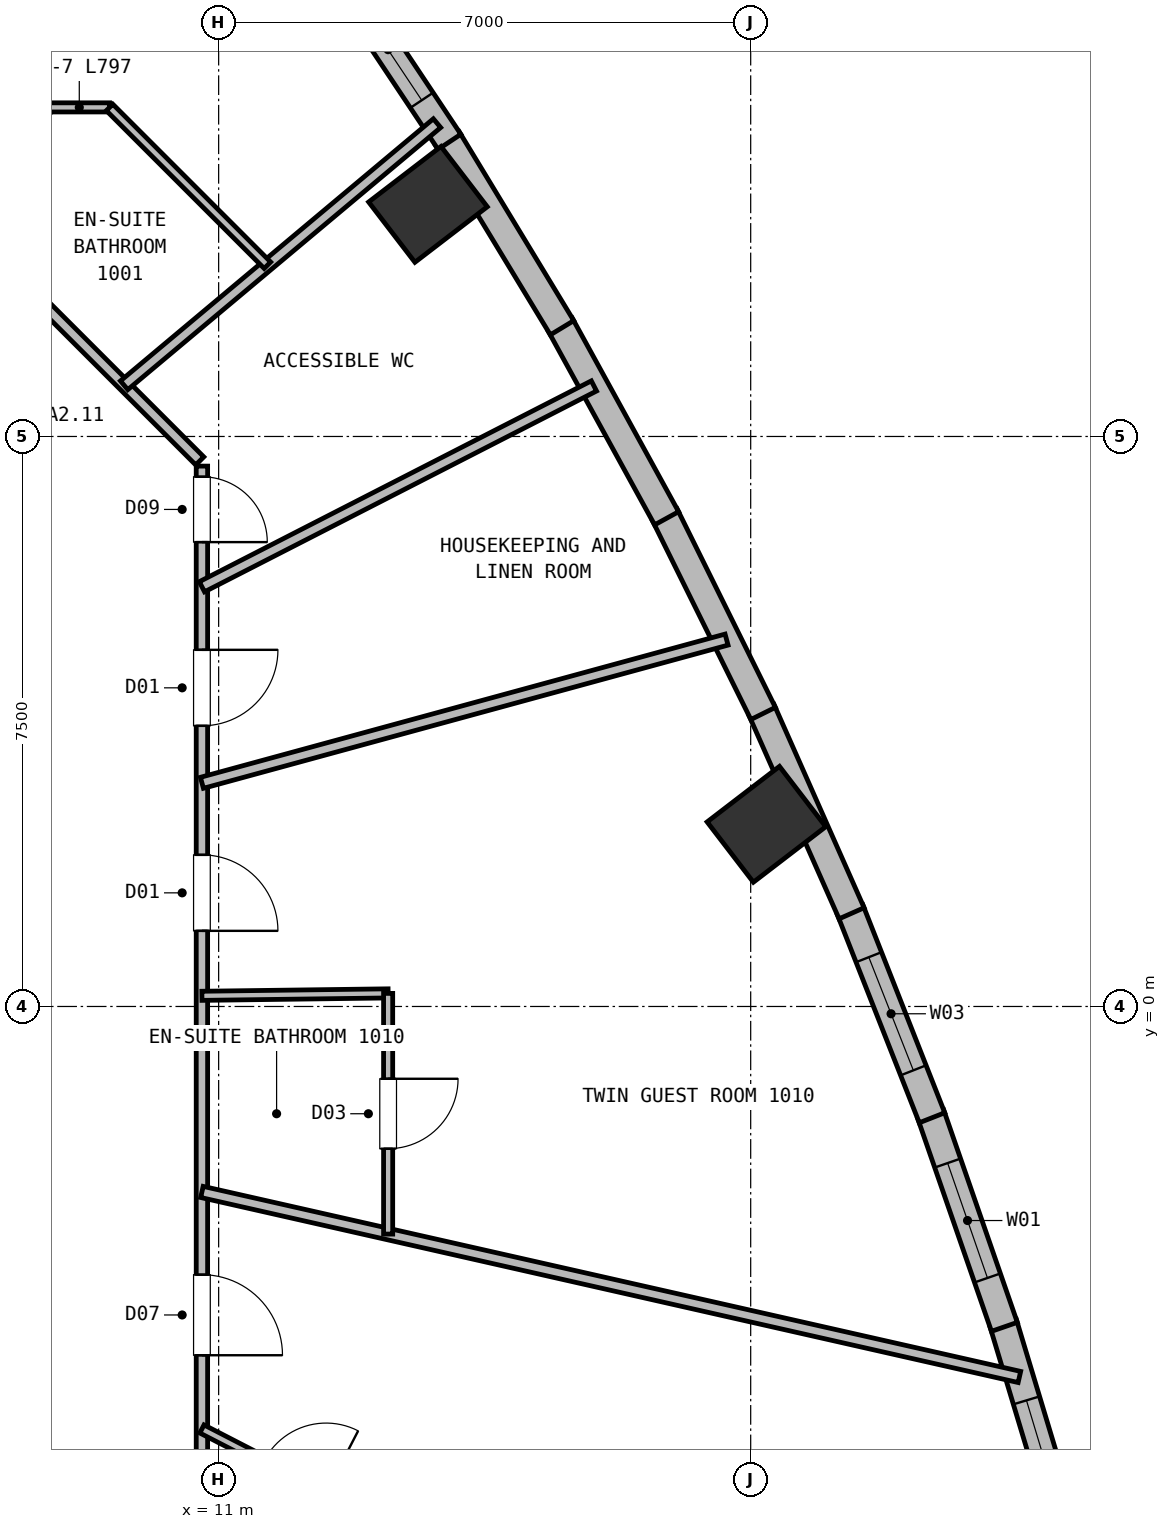
"""IFC4 building model, lengths in metres.
Left out: names, types, materials, properties, quantities, classifications, styles, units other than length and angle.
Written with IfcOpenShell. Run it as: python <this file> out.ifc"""

import sys

from ifc_helpers import new_model, si_unit, direction, frame, frame_2d, origin, origin_2d, place, context, subcontext, project, spatial, rectangle, extrude, element, fill, save


model = new_model("IFC4")
c1 = context("Model", 3, precision=1e-05, world=origin(), true_north=direction((0.0, 1.0)))
c2 = subcontext(c1, "Body", "Model", "MODEL_VIEW")
j1 = project(units=[si_unit("LENGTHUNIT", "METRE"), si_unit("PLANEANGLEUNIT", "RADIAN")], contexts=[c1])
p1 = place(None, origin())
s1 = spatial("IfcSite", under=j1, at=p1, CompositionType="ELEMENT")
p2 = place(p1, origin())
s2 = spatial("IfcBuilding", under=s1, at=p2, CompositionType="ELEMENT")
p3 = place(p2, frame((0.0, 0.0, 34.25)))
s3 = spatial("IfcBuildingStorey", under=s2, at=p3, CompositionType="ELEMENT", Elevation=34.25)
for number, where, z_axis, x_axis in (
    (1, (18.207, 2.397, 0.0), (0.0, 0.0, 1.0), (-0.609, 0.793, 0.0)),
    (2, (13.754, 10.554, 0.0), (0.0, 0.0, 1.0), (-0.609, 0.793, 0.0)),
):
    element("IfcColumn", number, at=place(p3, frame(where, z_axis=z_axis, x_axis=x_axis)), inside=s3, PredefinedType="COLUMN", context=c2, shape_type="SweptSolid", body=[
        extrude(rectangle(XDim=1.0, YDim=1.2, at=origin_2d()), origin(), (0.0, 0.0, 1.0), 3.75),
    ])
p4 = place(p3, frame((21.323, -4.168, 0.0), z_axis=(0.0, 0.0, 1.0), x_axis=(0.288532480862, -0.957470107882, 0.0)))
e3 = element("IfcWall", 3, at=p4, inside=s3, PredefinedType="SOLIDWALL", context=c2, shape_type="SweptSolid", body=[
    extrude(rectangle(XDim=2.987, YDim=0.36, at=frame_2d((1.493, 0.0))), origin(), (0.0, 0.0, 1.0), 3.5),
])
p5 = place(p4, frame((1.06, 0.0, 0.72)))
e4 = element("IfcOpeningElement", 4, at=p5, cuts=e3, PredefinedType="OPENING", context=c2, shape_type="SweptSolid", body=[
    extrude(rectangle(XDim=1.6, YDim=1.88, at=frame_2d((0.8, 0.94))), frame((0.0, 0.19, 0.0), z_axis=(0.0, -1.0, 0.0), x_axis=(1.0, 0.0, 0.0)), (0.0, 0.0, 1.0), 0.38),
])
p6 = place(p3, frame((20.368, -1.417, 0.0), z_axis=(0.0, 0.0, 1.0), x_axis=(0.327385218266, -0.944890956069, 0.0)))
e5 = element("IfcWall", 5, at=p6, inside=s3, PredefinedType="SOLIDWALL", context=c2, shape_type="SweptSolid", body=[
    extrude(rectangle(XDim=2.961, YDim=0.36, at=frame_2d((1.48, 0.0))), origin(), (0.0, 0.0, 1.0), 3.5),
])
p7 = place(p6, frame((0.681, 0.0, 0.72)))
e6 = element("IfcOpeningElement", 6, at=p7, cuts=e5, PredefinedType="OPENING", context=c2, shape_type="SweptSolid", body=[
    extrude(rectangle(XDim=1.6, YDim=1.88, at=frame_2d((0.8, 0.94))), frame((0.0, 0.19, 0.0), z_axis=(0.0, -1.0, 0.0), x_axis=(1.0, 0.0, 0.0)), (0.0, 0.0, 1.0), 0.38),
])
p8 = place(p3, frame((19.308, 1.272, 0.0), z_axis=(0.0, 0.0, 1.0), x_axis=(0.366361181184, -0.930472721213, 0.0)))
e7 = element("IfcWall", 7, at=p8, inside=s3, PredefinedType="SOLIDWALL", context=c2, shape_type="SweptSolid", body=[
    extrude(rectangle(XDim=2.941, YDim=0.36, at=frame_2d((1.47, 0.0))), origin(), (0.0, 0.0, 1.0), 3.5),
])
p9 = place(p8, frame((0.67, 0.0, 0.72)))
e8 = element("IfcOpeningElement", 8, at=p9, cuts=e7, PredefinedType="OPENING", context=c2, shape_type="SweptSolid", body=[
    extrude(rectangle(XDim=1.6, YDim=1.88, at=frame_2d((0.8, 0.94))), frame((0.0, 0.19, 0.0), z_axis=(0.0, -1.0, 0.0), x_axis=(1.0, 0.0, 0.0)), (0.0, 0.0, 1.0), 0.38),
])
p10 = place(p3, frame((18.143, 3.901, 0.0), z_axis=(0.0, 0.0, 1.0), x_axis=(0.405100583427, -0.914272124319, 0.0)))
e9 = element("IfcWall", 9, at=p10, inside=s3, PredefinedType="SOLIDWALL", context=c2, shape_type="SweptSolid", body=[
    extrude(rectangle(XDim=2.925, YDim=0.36, at=frame_2d((1.463, 0.0))), origin(), (0.0, 0.0, 1.0), 3.5),
])
p11 = place(p3, frame((16.871, 6.468, 0.0), z_axis=(0.0, 0.0, 1.0), x_axis=(0.44365878996, -0.896195781117, 0.0)))
e10 = element("IfcWall", 10, at=p11, inside=s3, PredefinedType="SOLIDWALL", context=c2, shape_type="SweptSolid", body=[
    extrude(rectangle(XDim=2.915, YDim=0.36, at=frame_2d((1.458, 0.0))), origin(), (0.0, 0.0, 1.0), 3.5),
])
p12 = place(p3, frame((15.493, 8.974, 0.0), z_axis=(0.0, 0.0, 1.0), x_axis=(0.481319495438, -0.876545231754, 0.0)))
e11 = element("IfcWall", 11, at=p12, inside=s3, PredefinedType="SOLIDWALL", context=c2, shape_type="SweptSolid", body=[
    extrude(rectangle(XDim=2.909, YDim=0.36, at=frame_2d((1.455, 0.0))), origin(), (0.0, 0.0, 1.0), 3.5),
])
p13 = place(p3, frame((14.01, 11.419, 0.0), z_axis=(0.0, 0.0, 1.0), x_axis=(0.518463491903, -0.855099764685, 0.0)))
e12 = element("IfcWall", 12, at=p13, inside=s3, PredefinedType="SOLIDWALL", context=c2, shape_type="SweptSolid", body=[
    extrude(rectangle(XDim=2.91, YDim=0.36, at=frame_2d((1.455, 0.0))), origin(), (0.0, 0.0, 1.0), 3.5),
])
p14 = place(p3, frame((12.421, 13.802, 0.0), z_axis=(0.0, 0.0, 1.0), x_axis=(0.554410222631, -0.832243537099, 0.0)))
e13 = element("IfcWall", 13, at=p14, inside=s3, PredefinedType="SOLIDWALL", context=c2, shape_type="SweptSolid", body=[
    extrude(rectangle(XDim=2.915, YDim=0.36, at=frame_2d((1.458, 0.0))), origin(), (0.0, 0.0, 1.0), 3.5),
])
p15 = place(p14, frame((0.657, 0.0, 0.72)))
e14 = element("IfcOpeningElement", 14, at=p15, cuts=e13, PredefinedType="OPENING", context=c2, shape_type="SweptSolid", body=[
    extrude(rectangle(XDim=1.6, YDim=1.88, at=frame_2d((0.8, 0.94))), frame((0.0, 0.19, 0.0), z_axis=(0.0, -1.0, 0.0), x_axis=(1.0, 0.0, 0.0)), (0.0, 0.0, 1.0), 0.38),
])
p16 = place(p3, frame((10.78, 7.11, 0.0), z_axis=(0.0, 0.0, 1.0), x_axis=(0.0, -1.0, 0.0)))
e15 = element("IfcWall", 15, at=p16, inside=s3, PredefinedType="PARTITIONING", context=c2, shape_type="SweptSolid", body=[
    extrude(rectangle(XDim=14.22, YDim=0.15, at=frame_2d((7.11, 0.0))), origin(), (0.0, 0.0, 1.0), 3.12),
])
p17 = place(p16, frame((0.14, 0.0, 0.0)))
e16 = element("IfcOpeningElement", 16, at=p17, cuts=e15, PredefinedType="OPENING", context=c2, shape_type="SweptSolid", body=[
    extrude(rectangle(XDim=0.86, YDim=2.05, at=frame_2d((0.43, 1.025))), frame((0.0, 0.085, 0.0), z_axis=(0.0, -1.0, 0.0), x_axis=(1.0, 0.0, 0.0)), (0.0, 0.0, 1.0), 0.17),
])
p18 = place(p16, frame((2.417, 0.0, 0.0)))
e17 = element("IfcOpeningElement", 17, at=p18, cuts=e15, PredefinedType="OPENING", context=c2, shape_type="SweptSolid", body=[
    extrude(rectangle(XDim=1.0, YDim=2.15, at=frame_2d((0.5, 1.075))), frame((0.0, 0.085, 0.0), z_axis=(0.0, -1.0, 0.0), x_axis=(1.0, 0.0, 0.0)), (0.0, 0.0, 1.0), 0.17),
])
p19 = place(p16, frame((5.115, 0.0, 0.0)))
e18 = element("IfcOpeningElement", 18, at=p19, cuts=e15, PredefinedType="OPENING", context=c2, shape_type="SweptSolid", body=[
    extrude(rectangle(XDim=1.0, YDim=2.15, at=frame_2d((0.5, 1.075))), frame((0.0, 0.085, 0.0), z_axis=(0.0, -1.0, 0.0), x_axis=(1.0, 0.0, 0.0)), (0.0, 0.0, 1.0), 0.17),
])
p20 = place(p16, frame((10.639, 0.0, 0.0)))
e19 = element("IfcOpeningElement", 19, at=p20, cuts=e15, PredefinedType="OPENING", context=c2, shape_type="SweptSolid", body=[
    extrude(rectangle(XDim=1.06, YDim=2.15, at=frame_2d((0.53, 1.075))), frame((0.0, 0.085, 0.0), z_axis=(0.0, -1.0, 0.0), x_axis=(1.0, 0.0, 0.0)), (0.0, 0.0, 1.0), 0.17),
])
p21 = place(p3, frame((8.578, 9.352, 0.0), z_axis=(0.0, 0.0, 1.0), x_axis=(0.707067066127, -0.707146494016, 0.0)))
e20 = element("IfcWall", 20, at=p21, inside=s3, PredefinedType="PARTITIONING", context=c2, shape_type="SweptSolid", body=[
    extrude(rectangle(XDim=3.074, YDim=0.15, at=frame_2d((1.537, 0.0))), origin(), (0.0, 0.0, 1.0), 3.5),
])
p22 = place(p3, frame((9.756, 8.174, 0.0), z_axis=(0.0, 0.0, 1.0), x_axis=(0.766556770399, 0.642176547186, 0.0)))
e21 = element("IfcWall", 21, at=p22, inside=s3, PredefinedType="PARTITIONING", context=c2, shape_type="SweptSolid", body=[
    extrude(rectangle(XDim=5.37, YDim=0.15, at=frame_2d((2.685, 0.0))), origin(), (0.0, 0.0, 1.0), 3.5),
])
p23 = place(p3, frame((6.952, 9.38, 0.0), z_axis=(0.0, 0.0, 1.0), x_axis=(0.595378789074, 0.80344514282, 0.0)))
e22 = element("IfcWall", 22, at=p23, inside=s3, PredefinedType="PARTITIONING", context=c2, shape_type="SweptSolid", body=[
    extrude(rectangle(XDim=3.05, YDim=0.12, at=frame_2d((1.525, 0.0))), origin(), (0.0, 0.0, 1.0), 3.5),
])
p24 = place(p23, frame((1.065, 0.0, 0.0)))
e23 = element("IfcOpeningElement", 23, at=p24, cuts=e22, PredefinedType="OPENING", context=c2, shape_type="SweptSolid", body=[
    extrude(rectangle(XDim=0.92, YDim=2.1, at=frame_2d((0.46, 1.05))), frame((0.0, 0.07, 0.0), z_axis=(0.0, -1.0, 0.0), x_axis=(1.0, 0.0, 0.0)), (0.0, 0.0, 1.0), 0.14),
])
p25 = place(p3, frame((8.768, 11.83, 0.0), z_axis=(0.0, 0.0, 1.0), x_axis=(1.0, 0.0, 0.0)))
e24 = element("IfcWall", 24, at=p25, inside=s3, PredefinedType="PARTITIONING", context=c2, shape_type="SweptSolid", body=[
    extrude(rectangle(XDim=0.797, YDim=0.12, at=frame_2d((0.398, 0.0))), origin(), (0.0, 0.0, 1.0), 3.5),
])
p26 = place(p3, frame((9.565, 11.83, 0.0), z_axis=(0.0, 0.0, 1.0), x_axis=(0.707106781187, -0.707106781187, 0.0)))
e25 = element("IfcWall", 25, at=p26, inside=s3, PredefinedType="PARTITIONING", context=c2, shape_type="SweptSolid", body=[
    extrude(rectangle(XDim=2.938, YDim=0.12, at=frame_2d((1.469, 0.0))), origin(), (0.0, 0.0, 1.0), 3.5),
])
p27 = place(p3, frame((10.78, -5.559, 0.0), z_axis=(0.0, 0.0, 1.0), x_axis=(0.888777799958, -0.458338327333, 0.0)))
e26 = element("IfcWall", 26, at=p27, inside=s3, PredefinedType="PARTITIONING", context=c2, shape_type="SweptSolid", body=[
    extrude(rectangle(XDim=2.757, YDim=0.12, at=frame_2d((1.378, 0.0))), origin(), (0.0, 0.0, 1.0), 3.5),
])
p28 = place(p27, frame((0.918, 0.0, 0.0)))
e27 = element("IfcOpeningElement", 27, at=p28, cuts=e26, PredefinedType="OPENING", context=c2, shape_type="SweptSolid", body=[
    extrude(rectangle(XDim=0.92, YDim=2.1, at=frame_2d((0.46, 1.05))), frame((0.0, 0.07, 0.0), z_axis=(0.0, -1.0, 0.0), x_axis=(1.0, 0.0, 0.0)), (0.0, 0.0, 1.0), 0.14),
])
p29 = place(p3, frame((10.78, -2.44, 0.0), z_axis=(0.0, 0.0, 1.0), x_axis=(0.97532517317, -0.220773201681, 0.0)))
e28 = element("IfcWall", 28, at=p29, inside=s3, PredefinedType="PARTITIONING", context=c2, shape_type="SweptSolid", body=[
    extrude(rectangle(XDim=11.028, YDim=0.15, at=frame_2d((5.514, 0.0))), origin(), (0.0, 0.0, 1.0), 3.5),
])
p30 = place(p3, frame((13.23, 0.172, 0.0), z_axis=(0.0, 0.0, 1.0), x_axis=(-0.999916098969, -0.012953571785, 0.0)))
e29 = element("IfcWall", 29, at=p30, inside=s3, PredefinedType="PARTITIONING", context=c2, shape_type="SweptSolid", body=[
    extrude(rectangle(XDim=2.45, YDim=0.12, at=frame_2d((1.225, 0.0))), origin(), (0.0, 0.0, 1.0), 3.5),
])
p31 = place(p3, frame((13.23, 0.172, 0.0), z_axis=(0.0, 0.0, 1.0), x_axis=(0.0, -1.0, 0.0)))
e30 = element("IfcWall", 30, at=p31, inside=s3, PredefinedType="PARTITIONING", context=c2, shape_type="SweptSolid", body=[
    extrude(rectangle(XDim=3.167, YDim=0.12, at=frame_2d((1.583, 0.0))), origin(), (0.0, 0.0, 1.0), 3.12),
])
p32 = place(p31, frame((1.124, 0.0, 0.0)))
e31 = element("IfcOpeningElement", 31, at=p32, cuts=e30, PredefinedType="OPENING", context=c2, shape_type="SweptSolid", body=[
    extrude(rectangle(XDim=0.92, YDim=2.1, at=frame_2d((0.46, 1.05))), frame((0.0, 0.07, 0.0), z_axis=(0.0, -1.0, 0.0), x_axis=(1.0, 0.0, 0.0)), (0.0, 0.0, 1.0), 0.14),
])
p33 = place(p3, frame((10.78, 2.943, 0.0), z_axis=(0.0, 0.0, 1.0), x_axis=(0.964692920296, 0.263377238063, 0.0)))
e32 = element("IfcWall", 32, at=p33, inside=s3, PredefinedType="PARTITIONING", context=c2, shape_type="SweptSolid", body=[
    extrude(rectangle(XDim=7.155, YDim=0.15, at=frame_2d((3.578, 0.0))), origin(), (0.0, 0.0, 1.0), 3.5),
])
p34 = place(p3, frame((10.78, 5.522, 0.0), z_axis=(0.0, 0.0, 1.0), x_axis=(0.889994161799, 0.455971920149, 0.0)))
e33 = element("IfcWall", 33, at=p34, inside=s3, PredefinedType="PARTITIONING", context=c2, shape_type="SweptSolid", body=[
    extrude(rectangle(XDim=5.795, YDim=0.15, at=frame_2d((2.897, 0.0))), origin(), (0.0, 0.0, 1.0), 3.5),
])
p35 = place(p5, origin())
e34 = element("IfcWindow", 34, at=p35, inside=s3, PartitioningType="SINGLE_PANEL", PredefinedType="WINDOW", context=c2, shape_type="SweptSolid", body=[
    extrude(rectangle(XDim=1.6, YDim=1.88, at=frame_2d((0.8, 0.94))), frame((0.0, 0.03, 0.0), z_axis=(0.0, -1.0, 0.0), x_axis=(1.0, 0.0, 0.0)), (0.0, 0.0, 1.0), 0.06),
])
fill(e4, e34)
p36 = place(p7, origin())
e35 = element("IfcWindow", 35, at=p36, inside=s3, PartitioningType="SINGLE_PANEL", PredefinedType="WINDOW", context=c2, shape_type="SweptSolid", body=[
    extrude(rectangle(XDim=1.6, YDim=1.88, at=frame_2d((0.8, 0.94))), frame((0.0, 0.03, 0.0), z_axis=(0.0, -1.0, 0.0), x_axis=(1.0, 0.0, 0.0)), (0.0, 0.0, 1.0), 0.06),
])
fill(e6, e35)
p37 = place(p9, origin())
e36 = element("IfcWindow", 36, at=p37, inside=s3, PartitioningType="SINGLE_PANEL", PredefinedType="WINDOW", context=c2, shape_type="SweptSolid", body=[
    extrude(rectangle(XDim=1.6, YDim=1.88, at=frame_2d((0.8, 0.94))), frame((0.0, 0.03, 0.0), z_axis=(0.0, -1.0, 0.0), x_axis=(1.0, 0.0, 0.0)), (0.0, 0.0, 1.0), 0.06),
])
fill(e8, e36)
p38 = place(p15, origin())
e37 = element("IfcWindow", 37, at=p38, inside=s3, PartitioningType="SINGLE_PANEL", PredefinedType="WINDOW", context=c2, shape_type="SweptSolid", body=[
    extrude(rectangle(XDim=1.6, YDim=1.88, at=frame_2d((0.8, 0.94))), frame((0.0, 0.03, 0.0), z_axis=(0.0, -1.0, 0.0), x_axis=(1.0, 0.0, 0.0)), (0.0, 0.0, 1.0), 0.06),
])
fill(e14, e37)
p39 = place(p32, origin())
e38 = element("IfcDoor", 38, at=p39, inside=s3, OperationType="SINGLE_SWING_LEFT", PredefinedType="DOOR", context=c2, shape_type="SweptSolid", body=[
    extrude(rectangle(XDim=0.92, YDim=2.1, at=frame_2d((0.46, 1.05))), frame((0.0, 0.025, 0.0), z_axis=(0.0, -1.0, 0.0), x_axis=(1.0, 0.0, 0.0)), (0.0, 0.0, 1.0), 0.05),
])
fill(e31, e38)
p40 = place(p17, origin())
e39 = element("IfcDoor", 39, at=p40, inside=s3, OperationType="SINGLE_SWING_RIGHT", PredefinedType="DOOR", context=c2, shape_type="SweptSolid", body=[
    extrude(rectangle(XDim=0.86, YDim=2.05, at=frame_2d((0.43, 1.025))), frame((0.0, 0.025, 0.0), z_axis=(0.0, -1.0, 0.0), x_axis=(1.0, 0.0, 0.0)), (0.0, 0.0, 1.0), 0.05),
])
fill(e16, e39)
p41 = place(p18, origin())
e40 = element("IfcDoor", 40, at=p41, inside=s3, OperationType="SINGLE_SWING_LEFT", PredefinedType="DOOR", context=c2, shape_type="SweptSolid", body=[
    extrude(rectangle(XDim=1.0, YDim=2.15, at=frame_2d((0.5, 1.075))), frame((0.0, 0.025, 0.0), z_axis=(0.0, -1.0, 0.0), x_axis=(1.0, 0.0, 0.0)), (0.0, 0.0, 1.0), 0.05),
])
fill(e17, e40)
p42 = place(p19, origin())
e41 = element("IfcDoor", 41, at=p42, inside=s3, OperationType="SINGLE_SWING_RIGHT", PredefinedType="DOOR", context=c2, shape_type="SweptSolid", body=[
    extrude(rectangle(XDim=1.0, YDim=2.15, at=frame_2d((0.5, 1.075))), frame((0.0, 0.025, 0.0), z_axis=(0.0, -1.0, 0.0), x_axis=(1.0, 0.0, 0.0)), (0.0, 0.0, 1.0), 0.05),
])
fill(e18, e41)
p43 = place(p20, origin())
e42 = element("IfcDoor", 42, at=p43, inside=s3, OperationType="SINGLE_SWING_RIGHT", PredefinedType="DOOR", context=c2, shape_type="SweptSolid", body=[
    extrude(rectangle(XDim=1.06, YDim=2.15, at=frame_2d((0.53, 1.075))), frame((0.0, 0.025, 0.0), z_axis=(0.0, -1.0, 0.0), x_axis=(1.0, 0.0, 0.0)), (0.0, 0.0, 1.0), 0.05),
])
fill(e19, e42)
save(model, sys.argv[1])
